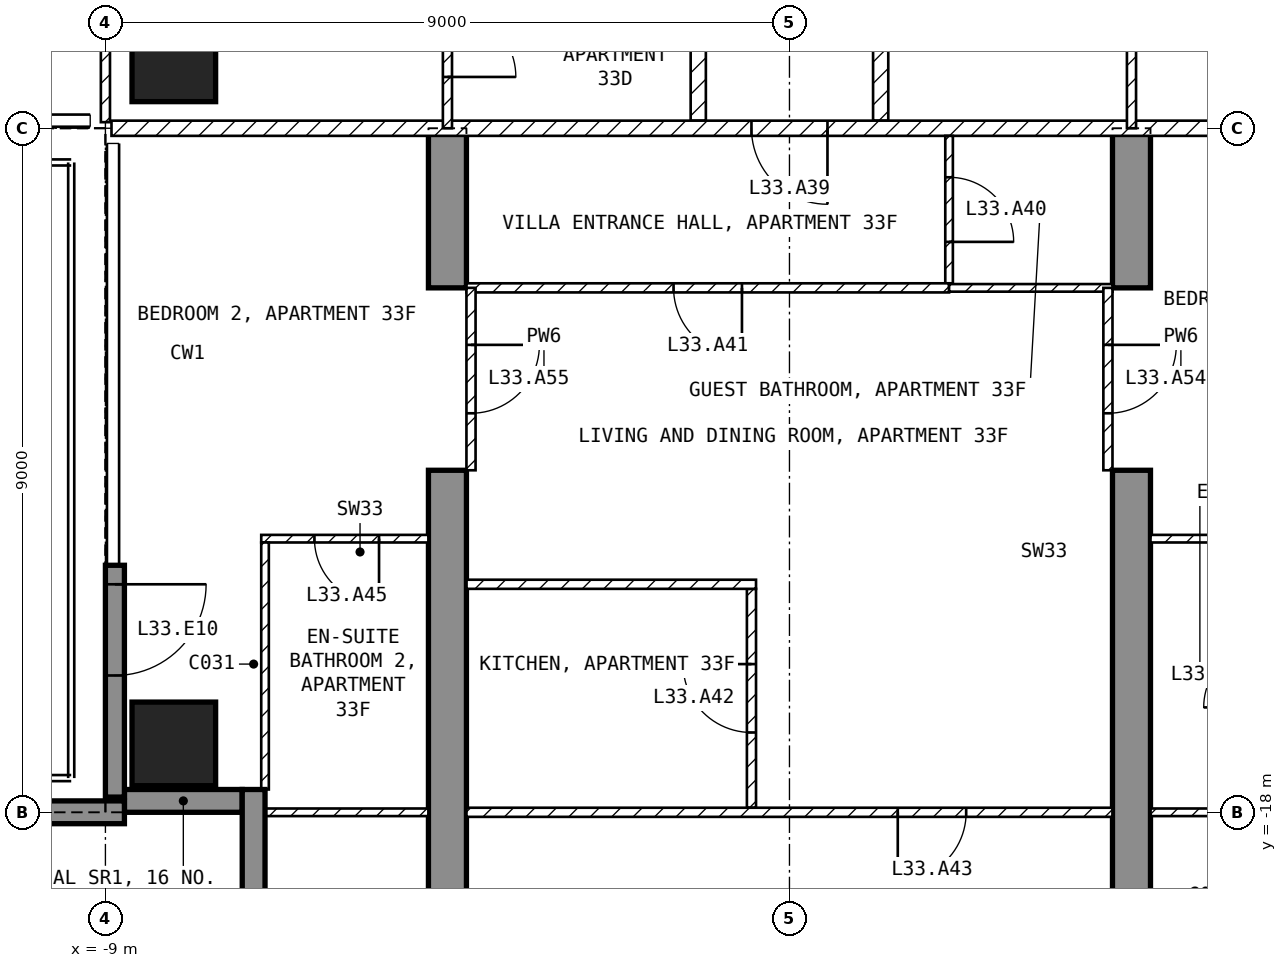
"""IFC4 building model, lengths in metres.
Left out: names, types, materials, properties, quantities, classifications, styles, units other than length and angle.
Written with IfcOpenShell. Run it as: python <this file> out.ifc"""

import sys

from ifc_helpers import new_model, si_unit, direction, frame, frame_2d, origin, origin_2d, place, context, subcontext, project, spatial, polyline, rectangle, outline, extrude, element, fill, save


model = new_model("IFC4")
c1 = context("Model", 3, precision=1e-05, world=origin(), true_north=direction((0.0, 1.0)))
c2 = subcontext(c1, "Body", "Model", "MODEL_VIEW")
j1 = project(units=[si_unit("LENGTHUNIT", "METRE"), si_unit("PLANEANGLEUNIT", "RADIAN")], contexts=[c1])
p1 = place(None, origin())
s1 = spatial("IfcSite", under=j1, at=p1, CompositionType="ELEMENT")
p2 = place(p1, origin())
s2 = spatial("IfcBuilding", under=s1, at=p2, CompositionType="ELEMENT")
p3 = place(p2, frame((0.0, 0.0, 137.4)))
s3 = spatial("IfcBuildingStorey", under=s2, at=p3, CompositionType="ELEMENT", Elevation=137.4)
for number, where, z_axis, x_axis in (
    (1, (-8.1, -17.1, -0.25), (0.0, 0.0, 1.0), (1.0, 0.0, 0.0)),
    (2, (-8.1, -8.1, -0.25), (0.0, 0.0, 1.0), (1.0, 0.0, 0.0)),
):
    element("IfcColumn", number, at=place(p3, frame(where, z_axis=z_axis, x_axis=x_axis)), inside=s3, PredefinedType="COLUMN", context=c2, shape_type="SweptSolid", body=[
        extrude(rectangle(XDim=1.1, YDim=1.1, at=origin_2d()), origin(), (0.0, 0.0, 1.0), 3.5),
    ])
for number, where, z_axis, x_axis in (
    (3, (-4.75, -20.15, -0.25), (1.0, 0.0, 0.0), (0.0, 1.0, 0.0)),
    (4, (4.25, -20.15, -0.25), (1.0, 0.0, 0.0), (0.0, 1.0, 0.0)),
):
    element("IfcWall", number, at=place(p3, frame(where, z_axis=z_axis, x_axis=x_axis)), inside=s3, PredefinedType="SHEAR", context=c2, shape_type="SweptSolid", body=[
        extrude(outline(polyline([(0.0, 0.0), (6.65, 0.0), (6.65, 2.65), (9.05, 2.65), (9.05, 0.0), (11.15, 0.0), (11.15, 3.5), (0.0, 3.5), (0.0, 0.0)])), origin(), (0.0, 0.0, 1.0), 0.5),
    ])
p4 = place(p3, frame((-8.875, -14.75, 0.0), z_axis=(0.0, 0.0, 1.0), x_axis=(0.0, -1.0, 0.0)))
e5 = element("IfcWall", 5, at=p4, inside=s3, PredefinedType="SOLIDWALL", context=c2, shape_type="SweptSolid", body=[
    extrude(rectangle(XDim=3.05, YDim=0.25, at=frame_2d((1.525, 0.0))), origin(), (0.0, 0.0, 1.0), 3.25),
])
p5 = place(p4, frame((0.25, 0.0, 0.0)))
e6 = element("IfcOpeningElement", 6, at=p5, cuts=e5, PredefinedType="OPENING", context=c2, shape_type="SweptSolid", body=[
    extrude(rectangle(XDim=1.2, YDim=2.4, at=frame_2d((0.6, 1.2))), frame((0.0, 0.135, 0.0), z_axis=(0.0, -1.0, 0.0), x_axis=(1.0, 0.0, 0.0)), (0.0, 0.0, 1.0), 0.27),
])
p6 = place(p3, frame((-8.75, -17.85, 0.0), z_axis=(0.0, 0.0, 1.0), x_axis=(1.0, 0.0, 0.0)))
e7 = element("IfcWall", 7, at=p6, inside=s3, PredefinedType="SOLIDWALL", context=c2, shape_type="SweptSolid", body=[
    extrude(rectangle(XDim=1.55, YDim=0.3, at=frame_2d((0.775, 0.0))), origin(), (0.0, 0.0, 1.0), 3.25),
])
p7 = place(p3, frame((-7.05, -17.7, 0.0), z_axis=(0.0, 0.0, 1.0), x_axis=(0.0, -1.0, 0.0)))
e8 = element("IfcWall", 8, at=p7, inside=s3, PredefinedType="SOLIDWALL", context=c2, shape_type="SweptSolid", body=[
    extrude(rectangle(XDim=1.8, YDim=0.3, at=frame_2d((0.9, 0.0))), origin(), (0.0, 0.0, 1.0), 3.25),
])
p8 = place(p3, frame((-8.75, -18.0, 0.0), z_axis=(0.0, 0.0, 1.0), x_axis=(-1.0, 0.0, 0.0)))
e9 = element("IfcWall", 9, at=p8, inside=s3, PredefinedType="SOLIDWALL", context=c2, shape_type="SweptSolid", body=[
    extrude(rectangle(XDim=2.99, YDim=0.3, at=frame_2d((1.495, 0.0))), origin(), (0.0, 0.0, 1.0), 3.25),
])
for number, where, z_axis, x_axis in (
    (10, (1.2, -4.6, 0.0), (0.0, 0.0, 1.0), (0.0, -1.0, 0.0)),
    (11, (-1.2, -8.9, 0.0), (0.0, 0.0, 1.0), (0.0, 1.0, 0.0)),
):
    element("IfcWall", number, at=place(p3, frame(where, z_axis=z_axis, x_axis=x_axis)), inside=s3, PredefinedType="PARTITIONING", context=c2, shape_type="SweptSolid", body=[
        extrude(rectangle(XDim=4.3, YDim=0.2, at=frame_2d((2.15, 0.0))), origin(), (0.0, 0.0, 1.0), 3.25),
    ])
p9 = place(p3, frame((8.92, -9.0, 0.0), z_axis=(0.0, 0.0, 1.0), x_axis=(-1.0, 0.0, 0.0)))
e12 = element("IfcWall", 12, at=p9, inside=s3, PredefinedType="PARTITIONING", context=c2, shape_type="SweptSolid", body=[
    extrude(rectangle(XDim=17.84, YDim=0.2, at=frame_2d((8.92, 0.0))), origin(), (0.0, 0.0, 1.0), 3.25),
])
p10 = place(p9, frame((8.42, 0.0, 0.0)))
e13 = element("IfcOpeningElement", 13, at=p10, cuts=e12, PredefinedType="OPENING", context=c2, shape_type="SweptSolid", body=[
    extrude(rectangle(XDim=1.0, YDim=2.1, at=frame_2d((0.5, 1.05))), frame((0.0, 0.11, 0.0), z_axis=(0.0, -1.0, 0.0), x_axis=(1.0, 0.0, 0.0)), (0.0, 0.0, 1.0), 0.22),
])
p11 = place(p3, frame((4.5, -9.0, 0.0), z_axis=(0.0, 0.0, 1.0), x_axis=(0.0, 1.0, 0.0)))
e14 = element("IfcWall", 14, at=p11, inside=s3, PredefinedType="PARTITIONING", context=c2, shape_type="SweptSolid", body=[
    extrude(rectangle(XDim=4.5, YDim=0.12, at=frame_2d((2.25, 0.0))), origin(), (0.0, 0.0, 1.0), 3.25),
])
p12 = place(p11, frame((1.8, 0.0, 0.0)))
e15 = element("IfcOpeningElement", 15, at=p12, cuts=e14, PredefinedType="OPENING", context=c2, shape_type="SweptSolid", body=[
    extrude(rectangle(XDim=0.9, YDim=2.1, at=frame_2d((0.45, 1.05))), frame((0.0, 0.07, 0.0), z_axis=(0.0, -1.0, 0.0), x_axis=(1.0, 0.0, 0.0)), (0.0, 0.0, 1.0), 0.14),
])
p13 = place(p3, frame((-9.0, -1.3, 0.0), z_axis=(0.0, 0.0, 1.0), x_axis=(0.0, -1.0, 0.0)))
e16 = element("IfcWall", 16, at=p13, inside=s3, PredefinedType="PARTITIONING", context=c2, shape_type="SweptSolid", body=[
    extrude(rectangle(XDim=7.62, YDim=0.12, at=frame_2d((3.81, 0.0))), origin(), (0.0, 0.0, 1.0), 3.25),
])
p14 = place(p13, frame((0.85, 0.0, 0.0)))
e17 = element("IfcOpeningElement", 17, at=p14, cuts=e16, PredefinedType="OPENING", context=c2, shape_type="SweptSolid", body=[
    extrude(rectangle(XDim=0.9, YDim=2.1, at=frame_2d((0.45, 1.05))), frame((0.0, 0.07, 0.0), z_axis=(0.0, -1.0, 0.0), x_axis=(1.0, 0.0, 0.0)), (0.0, 0.0, 1.0), 0.14),
])
p15 = place(p3, frame((-4.5, -6.75, 0.0), z_axis=(0.0, 0.0, 1.0), x_axis=(0.0, -1.0, 0.0)))
e18 = element("IfcWall", 18, at=p15, inside=s3, PredefinedType="PARTITIONING", context=c2, shape_type="SweptSolid", body=[
    extrude(rectangle(XDim=2.25, YDim=0.12, at=frame_2d((1.125, 0.0))), origin(), (0.0, 0.0, 1.0), 3.25),
])
p16 = place(p15, frame((0.675, 0.0, 0.0)))
e19 = element("IfcOpeningElement", 19, at=p16, cuts=e18, PredefinedType="OPENING", context=c2, shape_type="SweptSolid", body=[
    extrude(rectangle(XDim=0.9, YDim=2.1, at=frame_2d((0.45, 1.05))), frame((0.0, 0.07, 0.0), z_axis=(0.0, -1.0, 0.0), x_axis=(1.0, 0.0, 0.0)), (0.0, 0.0, 1.0), 0.14),
])
p17 = place(p3, frame((2.1, -9.1, 0.0), z_axis=(0.0, 0.0, 1.0), x_axis=(0.0, -1.0, 0.0)))
e20 = element("IfcWall", 20, at=p17, inside=s3, PredefinedType="PARTITIONING", context=c2, shape_type="SweptSolid", body=[
    extrude(rectangle(XDim=1.94, YDim=0.1, at=frame_2d((0.97, 0.0))), origin(), (0.0, 0.0, 1.0), 3.25),
])
p18 = place(p17, frame((0.545, 0.0, 0.0)))
e21 = element("IfcOpeningElement", 21, at=p18, cuts=e20, PredefinedType="OPENING", context=c2, shape_type="SweptSolid", body=[
    extrude(rectangle(XDim=0.85, YDim=2.1, at=frame_2d((0.425, 1.05))), frame((0.0, 0.06, 0.0), z_axis=(0.0, -1.0, 0.0), x_axis=(1.0, 0.0, 0.0)), (0.0, 0.0, 1.0), 0.12),
])
p19 = place(p3, frame((2.1, -11.1, 0.0), z_axis=(0.0, 0.0, 1.0), x_axis=(-1.0, 0.0, 0.0)))
e22 = element("IfcWall", 22, at=p19, inside=s3, PredefinedType="PARTITIONING", context=c2, shape_type="SweptSolid", body=[
    extrude(rectangle(XDim=6.35, YDim=0.12, at=frame_2d((3.175, 0.0))), origin(), (0.0, 0.0, 1.0), 3.25),
])
p20 = place(p19, frame((2.725, 0.0, 0.0)))
e23 = element("IfcOpeningElement", 23, at=p20, cuts=e22, PredefinedType="OPENING", context=c2, shape_type="SweptSolid", body=[
    extrude(rectangle(XDim=0.9, YDim=2.1, at=frame_2d((0.45, 1.05))), frame((0.0, 0.07, 0.0), z_axis=(0.0, -1.0, 0.0), x_axis=(1.0, 0.0, 0.0)), (0.0, 0.0, 1.0), 0.14),
])
p21 = place(p3, frame((4.25, -11.1, 0.0), z_axis=(0.0, 0.0, 1.0), x_axis=(-1.0, 0.0, 0.0)))
e24 = element("IfcWall", 24, at=p21, inside=s3, PredefinedType="PARTITIONING", context=c2, shape_type="SweptSolid", body=[
    extrude(rectangle(XDim=2.15, YDim=0.1, at=frame_2d((1.075, 0.0))), origin(), (0.0, 0.0, 1.0), 3.25),
])
p22 = place(p3, frame((-0.5, -17.94, 0.0), z_axis=(0.0, 0.0, 1.0), x_axis=(0.0, 1.0, 0.0)))
e25 = element("IfcWall", 25, at=p22, inside=s3, PredefinedType="PARTITIONING", context=c2, shape_type="SweptSolid", body=[
    extrude(rectangle(XDim=2.88, YDim=0.12, at=frame_2d((1.44, 0.0))), origin(), (0.0, 0.0, 1.0), 3.25),
])
p23 = place(p22, frame((0.99, 0.0, 0.0)))
e26 = element("IfcOpeningElement", 26, at=p23, cuts=e25, PredefinedType="OPENING", context=c2, shape_type="SweptSolid", body=[
    extrude(rectangle(XDim=0.9, YDim=2.1, at=frame_2d((0.45, 1.05))), frame((0.0, 0.07, 0.0), z_axis=(0.0, -1.0, 0.0), x_axis=(1.0, 0.0, 0.0)), (0.0, 0.0, 1.0), 0.14),
])
p24 = place(p3, frame((-0.44, -15.0, 0.0), z_axis=(0.0, 0.0, 1.0), x_axis=(-1.0, 0.0, 0.0)))
e27 = element("IfcWall", 27, at=p24, inside=s3, PredefinedType="PARTITIONING", context=c2, shape_type="SweptSolid", body=[
    extrude(rectangle(XDim=3.81, YDim=0.12, at=frame_2d((1.905, 0.0))), origin(), (0.0, 0.0, 1.0), 3.25),
])
p25 = place(p3, frame((4.25, -18.0, 0.0), z_axis=(0.0, 0.0, 1.0), x_axis=(-1.0, 0.0, 0.0)))
e28 = element("IfcWall", 28, at=p25, inside=s3, PredefinedType="PARTITIONING", context=c2, shape_type="SweptSolid", body=[
    extrude(rectangle(XDim=8.5, YDim=0.12, at=frame_2d((4.25, 0.0))), origin(), (0.0, 0.0, 1.0), 3.25),
])
p26 = place(p25, frame((1.925, 0.0, 0.0)))
e29 = element("IfcOpeningElement", 29, at=p26, cuts=e28, PredefinedType="OPENING", context=c2, shape_type="SweptSolid", body=[
    extrude(rectangle(XDim=0.9, YDim=2.1, at=frame_2d((0.45, 1.05))), frame((0.0, 0.07, 0.0), z_axis=(0.0, -1.0, 0.0), x_axis=(1.0, 0.0, 0.0)), (0.0, 0.0, 1.0), 0.14),
])
p27 = place(p3, frame((6.35, -14.4, 0.0), z_axis=(0.0, 0.0, 1.0), x_axis=(-1.0, 0.0, 0.0)))
e30 = element("IfcWall", 30, at=p27, inside=s3, PredefinedType="PARTITIONING", context=c2, shape_type="SweptSolid", body=[
    extrude(rectangle(XDim=1.6, YDim=0.1, at=frame_2d((0.8, 0.0))), origin(), (0.0, 0.0, 1.0), 3.25),
])
p28 = place(p3, frame((6.3, -18.0, 0.0), z_axis=(0.0, 0.0, 1.0), x_axis=(-1.0, 0.0, 0.0)))
e31 = element("IfcWall", 31, at=p28, inside=s3, PredefinedType="PARTITIONING", context=c2, shape_type="SweptSolid", body=[
    extrude(rectangle(XDim=1.55, YDim=0.1, at=frame_2d((0.775, 0.0))), origin(), (0.0, 0.0, 1.0), 3.25),
])
p29 = place(p3, frame((-4.75, -14.4, 0.0), z_axis=(0.0, 0.0, 1.0), x_axis=(-1.0, 0.0, 0.0)))
e32 = element("IfcWall", 32, at=p29, inside=s3, PredefinedType="PARTITIONING", context=c2, shape_type="SweptSolid", body=[
    extrude(rectangle(XDim=2.2, YDim=0.1, at=frame_2d((1.1, 0.0))), origin(), (0.0, 0.0, 1.0), 3.25),
])
p30 = place(p29, frame((0.65, 0.0, 0.0)))
e33 = element("IfcOpeningElement", 33, at=p30, cuts=e32, PredefinedType="OPENING", context=c2, shape_type="SweptSolid", body=[
    extrude(rectangle(XDim=0.85, YDim=2.1, at=frame_2d((0.425, 1.05))), frame((0.0, 0.06, 0.0), z_axis=(0.0, -1.0, 0.0), x_axis=(1.0, 0.0, 0.0)), (0.0, 0.0, 1.0), 0.12),
])
p31 = place(p3, frame((-6.9, -14.45, 0.0), z_axis=(0.0, 0.0, 1.0), x_axis=(0.0, -1.0, 0.0)))
e34 = element("IfcWall", 34, at=p31, inside=s3, PredefinedType="PARTITIONING", context=c2, shape_type="SweptSolid", body=[
    extrude(rectangle(XDim=3.25, YDim=0.1, at=frame_2d((1.625, 0.0))), origin(), (0.0, 0.0, 1.0), 3.25),
])
p32 = place(p3, frame((-4.75, -18.0, 0.0), z_axis=(0.0, 0.0, 1.0), x_axis=(-1.0, 0.0, 0.0)))
e35 = element("IfcWall", 35, at=p32, inside=s3, PredefinedType="PARTITIONING", context=c2, shape_type="SweptSolid", body=[
    extrude(rectangle(XDim=2.37, YDim=0.1, at=frame_2d((1.185, 0.0))), origin(), (0.0, 0.0, 1.0), 3.25),
])
p33 = place(p3, frame((4.19, -11.1, 0.0), z_axis=(0.0, 0.0, 1.0), x_axis=(0.0, -1.0, 0.0)))
e36 = element("IfcWall", 36, at=p33, inside=s3, PredefinedType="PARTITIONING", context=c2, shape_type="SweptSolid", body=[
    extrude(rectangle(XDim=2.4, YDim=0.12, at=frame_2d((1.2, 0.0))), origin(), (0.0, 0.0, 1.0), 2.4),
])
p34 = place(p33, frame((0.75, 0.0, 0.0)))
e37 = element("IfcOpeningElement", 37, at=p34, cuts=e36, PredefinedType="OPENING", context=c2, shape_type="SweptSolid", body=[
    extrude(rectangle(XDim=0.9, YDim=2.1, at=frame_2d((0.45, 1.05))), frame((0.0, 0.07, 0.0), z_axis=(0.0, -1.0, 0.0), x_axis=(1.0, 0.0, 0.0)), (0.0, 0.0, 1.0), 0.14),
])
p35 = place(p3, frame((-4.19, -11.1, 0.0), z_axis=(0.0, 0.0, 1.0), x_axis=(0.0, -1.0, 0.0)))
e38 = element("IfcWall", 38, at=p35, inside=s3, PredefinedType="PARTITIONING", context=c2, shape_type="SweptSolid", body=[
    extrude(rectangle(XDim=2.4, YDim=0.12, at=frame_2d((1.2, 0.0))), origin(), (0.0, 0.0, 1.0), 2.4),
])
p36 = place(p35, frame((0.75, 0.0, 0.0)))
e39 = element("IfcOpeningElement", 39, at=p36, cuts=e38, PredefinedType="OPENING", context=c2, shape_type="SweptSolid", body=[
    extrude(rectangle(XDim=0.9, YDim=2.1, at=frame_2d((0.45, 1.05))), frame((0.0, 0.07, 0.0), z_axis=(0.0, -1.0, 0.0), x_axis=(1.0, 0.0, 0.0)), (0.0, 0.0, 1.0), 0.14),
])
p37 = place(p5, origin())
e40 = element("IfcDoor", 40, at=p37, inside=s3, OperationType="SINGLE_SWING_LEFT", PredefinedType="DOOR", context=c2, shape_type="SweptSolid", body=[
    extrude(rectangle(XDim=1.2, YDim=2.4, at=frame_2d((0.6, 1.2))), frame((0.0, 0.025, 0.0), z_axis=(0.0, -1.0, 0.0), x_axis=(1.0, 0.0, 0.0)), (0.0, 0.0, 1.0), 0.05),
])
fill(e6, e40)
p38 = place(p16, origin())
e41 = element("IfcDoor", 41, at=p38, inside=s3, OperationType="SINGLE_SWING_RIGHT", PredefinedType="DOOR", context=c2, shape_type="SweptSolid", body=[
    extrude(rectangle(XDim=0.9, YDim=2.1, at=frame_2d((0.45, 1.05))), frame((0.0, 0.025, 0.0), z_axis=(0.0, -1.0, 0.0), x_axis=(1.0, 0.0, 0.0)), (0.0, 0.0, 1.0), 0.05),
])
fill(e19, e41)
p39 = place(p10, origin())
e42 = element("IfcDoor", 42, at=p39, inside=s3, OperationType="SINGLE_SWING_LEFT", PredefinedType="DOOR", context=c2, shape_type="SweptSolid", body=[
    extrude(rectangle(XDim=1.0, YDim=2.1, at=frame_2d((0.5, 1.05))), frame((0.0, 0.025, 0.0), z_axis=(0.0, -1.0, 0.0), x_axis=(1.0, 0.0, 0.0)), (0.0, 0.0, 1.0), 0.05),
])
fill(e13, e42)
p40 = place(p18, origin())
e43 = element("IfcDoor", 43, at=p40, inside=s3, OperationType="SINGLE_SWING_RIGHT", PredefinedType="DOOR", context=c2, shape_type="SweptSolid", body=[
    extrude(rectangle(XDim=0.85, YDim=2.1, at=frame_2d((0.425, 1.05))), frame((0.0, 0.025, 0.0), z_axis=(0.0, -1.0, 0.0), x_axis=(1.0, 0.0, 0.0)), (0.0, 0.0, 1.0), 0.05),
])
fill(e21, e43)
p41 = place(p20, origin())
e44 = element("IfcDoor", 44, at=p41, inside=s3, OperationType="SINGLE_SWING_LEFT", PredefinedType="DOOR", context=c2, shape_type="SweptSolid", body=[
    extrude(rectangle(XDim=0.9, YDim=2.1, at=frame_2d((0.45, 1.05))), frame((0.0, 0.025, 0.0), z_axis=(0.0, -1.0, 0.0), x_axis=(1.0, 0.0, 0.0)), (0.0, 0.0, 1.0), 0.05),
])
fill(e23, e44)
p42 = place(p23, origin())
e45 = element("IfcDoor", 45, at=p42, inside=s3, OperationType="SINGLE_SWING_RIGHT", PredefinedType="DOOR", context=c2, shape_type="SweptSolid", body=[
    extrude(rectangle(XDim=0.9, YDim=2.1, at=frame_2d((0.45, 1.05))), frame((0.0, 0.025, 0.0), z_axis=(0.0, -1.0, 0.0), x_axis=(1.0, 0.0, 0.0)), (0.0, 0.0, 1.0), 0.05),
])
fill(e26, e45)
p43 = place(p26, origin())
e46 = element("IfcDoor", 46, at=p43, inside=s3, OperationType="SINGLE_SWING_RIGHT", PredefinedType="DOOR", context=c2, shape_type="SweptSolid", body=[
    extrude(rectangle(XDim=0.9, YDim=2.1, at=frame_2d((0.45, 1.05))), frame((0.0, 0.025, 0.0), z_axis=(0.0, -1.0, 0.0), x_axis=(1.0, 0.0, 0.0)), (0.0, 0.0, 1.0), 0.05),
])
fill(e29, e46)
p44 = place(p30, origin())
e47 = element("IfcDoor", 47, at=p44, inside=s3, OperationType="SINGLE_SWING_LEFT", PredefinedType="DOOR", context=c2, shape_type="SweptSolid", body=[
    extrude(rectangle(XDim=0.85, YDim=2.1, at=frame_2d((0.425, 1.05))), frame((0.0, 0.025, 0.0), z_axis=(0.0, -1.0, 0.0), x_axis=(1.0, 0.0, 0.0)), (0.0, 0.0, 1.0), 0.05),
])
fill(e33, e47)
p45 = place(p34, origin())
e48 = element("IfcDoor", 48, at=p45, inside=s3, OperationType="SINGLE_SWING_LEFT", PredefinedType="DOOR", context=c2, shape_type="SweptSolid", body=[
    extrude(rectangle(XDim=0.9, YDim=2.1, at=frame_2d((0.45, 1.05))), frame((0.0, 0.025, 0.0), z_axis=(0.0, -1.0, 0.0), x_axis=(1.0, 0.0, 0.0)), (0.0, 0.0, 1.0), 0.05),
])
fill(e37, e48)
p46 = place(p36, origin())
e49 = element("IfcDoor", 49, at=p46, inside=s3, OperationType="SINGLE_SWING_LEFT", PredefinedType="DOOR", context=c2, shape_type="SweptSolid", body=[
    extrude(rectangle(XDim=0.9, YDim=2.1, at=frame_2d((0.45, 1.05))), frame((0.0, 0.025, 0.0), z_axis=(0.0, -1.0, 0.0), x_axis=(1.0, 0.0, 0.0)), (0.0, 0.0, 1.0), 0.05),
])
fill(e39, e49)
save(model, sys.argv[1])
